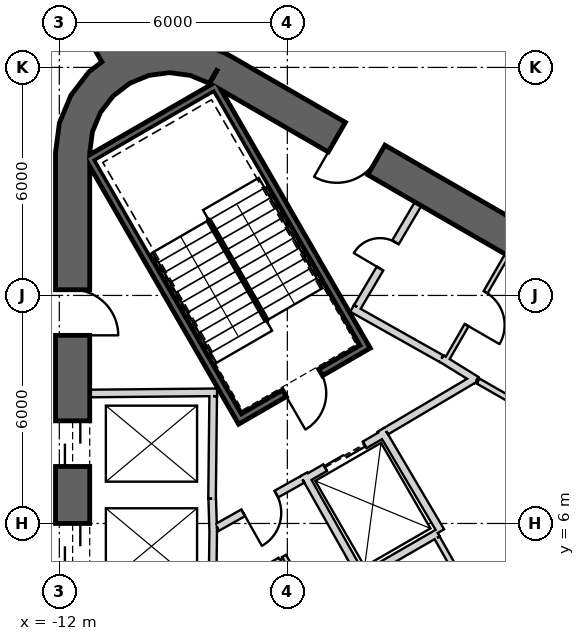
"""IFC4 building model, lengths in metres.
Left out: names, types, materials, properties, quantities, classifications, styles, units other than length and angle.
Written with IfcOpenShell. Run it as: python <this file> out.ifc"""

import sys

from ifc_helpers import new_model, si_unit, direction, frame, frame_2d, origin, place, context, subcontext, project, spatial, polyline, rectangle, outline, extrude, element, fill, save


model = new_model("IFC4")
c1 = context("Model", 3, precision=1e-05, world=origin(), true_north=direction((0.0, 1.0)))
c2 = subcontext(c1, "Body", "Model", "MODEL_VIEW")
j1 = project(units=[si_unit("LENGTHUNIT", "METRE"), si_unit("PLANEANGLEUNIT", "RADIAN")], contexts=[c1])
p1 = place(None, origin())
s1 = spatial("IfcSite", under=j1, at=p1, CompositionType="ELEMENT")
p2 = place(p1, origin())
s2 = spatial("IfcBuilding", under=s1, at=p2, CompositionType="ELEMENT")
p3 = place(p2, frame((0.0, 0.0, 181.2)))
s3 = spatial("IfcBuildingStorey", under=s2, at=p3, CompositionType="ELEMENT", Elevation=181.2)
p4 = place(p3, frame((19.475, 2.208, 0.0), z_axis=(0.0, 0.0, 1.0), x_axis=(-0.866028369851, 0.499994862586, 0.0)))
e1 = element("IfcWall", 1, at=p4, inside=s3, PredefinedType="SHEAR", context=c2, shape_type="SweptSolid", body=[
    extrude(rectangle(XDim=31.523, YDim=0.9, at=frame_2d((15.762, 0.0))), origin(), (0.0, 0.0, 1.0), 4.0),
])
p5 = place(p4, frame((7.062, 0.0, 0.0)))
e2 = element("IfcOpeningElement", 2, at=p5, cuts=e1, PredefinedType="OPENING", context=c2, shape_type="SweptSolid", body=[
    extrude(rectangle(XDim=1.2, YDim=2.4, at=frame_2d((0.6, 1.2))), frame((0.0, 0.46, 0.0), z_axis=(0.0, -1.0, 0.0), x_axis=(1.0, 0.0, 0.0)), (0.0, 0.0, 1.0), 0.92),
])
p6 = place(p4, frame((3.612, 0.0, 0.0)))
e3 = element("IfcOpeningElement", 3, at=p6, cuts=e1, PredefinedType="OPENING", context=c2, shape_type="SweptSolid", body=[
    extrude(rectangle(XDim=1.2, YDim=2.4, at=frame_2d((0.6, 1.2))), frame((0.0, 0.46, 0.0), z_axis=(0.0, -1.0, 0.0), x_axis=(1.0, 0.0, 0.0)), (0.0, 0.0, 1.0), 0.92),
])
p7 = place(p4, frame((26.712, 0.0, 0.0)))
e4 = element("IfcOpeningElement", 4, at=p7, cuts=e1, PredefinedType="OPENING", context=c2, shape_type="SweptSolid", body=[
    extrude(rectangle(XDim=1.2, YDim=2.4, at=frame_2d((0.6, 1.2))), frame((0.0, 0.46, 0.0), z_axis=(0.0, -1.0, 0.0), x_axis=(1.0, 0.0, 0.0)), (0.0, 0.0, 1.0), 0.92),
])
p8 = place(p3, frame((-11.65, 15.762, 0.0), z_axis=(0.0, 0.0, 1.0), x_axis=(0.0, -1.0, 0.0)))
e5 = element("IfcWall", 5, at=p8, inside=s3, PredefinedType="SHEAR", context=c2, shape_type="SweptSolid", body=[
    extrude(rectangle(XDim=31.523, YDim=0.9, at=frame_2d((15.762, 0.0))), origin(), (0.0, 0.0, 1.0), 4.0),
])
p9 = place(p8, frame((7.062, 0.0, 0.0)))
e6 = element("IfcOpeningElement", 6, at=p9, cuts=e5, PredefinedType="OPENING", context=c2, shape_type="SweptSolid", body=[
    extrude(rectangle(XDim=1.2, YDim=2.4, at=frame_2d((0.6, 1.2))), frame((0.0, 0.46, 0.0), z_axis=(0.0, -1.0, 0.0), x_axis=(1.0, 0.0, 0.0)), (0.0, 0.0, 1.0), 0.92),
])
p10 = place(p8, frame((9.762, 0.0, 0.0)))
e7 = element("IfcOpeningElement", 7, at=p10, cuts=e5, PredefinedType="OPENING", context=c2, shape_type="SweptSolid", body=[
    extrude(rectangle(XDim=1.2, YDim=2.4, at=frame_2d((0.6, 1.2))), frame((0.0, 0.46, 0.0), z_axis=(0.0, -1.0, 0.0), x_axis=(1.0, 0.0, 0.0)), (0.0, 0.0, 1.0), 0.92),
])
p11 = place(p8, frame((12.462, 0.0, 0.0)))
e8 = element("IfcOpeningElement", 8, at=p11, cuts=e5, PredefinedType="OPENING", context=c2, shape_type="SweptSolid", body=[
    extrude(rectangle(XDim=1.2, YDim=2.4, at=frame_2d((0.6, 1.2))), frame((0.0, 0.46, 0.0), z_axis=(0.0, -1.0, 0.0), x_axis=(1.0, 0.0, 0.0)), (0.0, 0.0, 1.0), 0.92),
])
p12 = place(p8, frame((15.162, 0.0, 0.0)))
e9 = element("IfcOpeningElement", 9, at=p12, cuts=e5, PredefinedType="OPENING", context=c2, shape_type="SweptSolid", body=[
    extrude(rectangle(XDim=1.2, YDim=2.4, at=frame_2d((0.6, 1.2))), frame((0.0, 0.46, 0.0), z_axis=(0.0, -1.0, 0.0), x_axis=(1.0, 0.0, 0.0)), (0.0, 0.0, 1.0), 0.92),
])
p13 = place(p8, frame((17.862, 0.0, 0.0)))
e10 = element("IfcOpeningElement", 10, at=p13, cuts=e5, PredefinedType="OPENING", context=c2, shape_type="SweptSolid", body=[
    extrude(rectangle(XDim=1.2, YDim=2.4, at=frame_2d((0.6, 1.2))), frame((0.0, 0.46, 0.0), z_axis=(0.0, -1.0, 0.0), x_axis=(1.0, 0.0, 0.0)), (0.0, 0.0, 1.0), 0.92),
])
p14 = place(p8, frame((20.562, 0.0, 0.0)))
e11 = element("IfcOpeningElement", 11, at=p14, cuts=e5, PredefinedType="OPENING", context=c2, shape_type="SweptSolid", body=[
    extrude(rectangle(XDim=1.2, YDim=2.4, at=frame_2d((0.6, 1.2))), frame((0.0, 0.46, 0.0), z_axis=(0.0, -1.0, 0.0), x_axis=(1.0, 0.0, 0.0)), (0.0, 0.0, 1.0), 0.92),
])
p15 = place(p8, frame((23.262, 0.0, 0.0)))
e12 = element("IfcOpeningElement", 12, at=p15, cuts=e5, PredefinedType="OPENING", context=c2, shape_type="SweptSolid", body=[
    extrude(rectangle(XDim=1.2, YDim=2.4, at=frame_2d((0.6, 1.2))), frame((0.0, 0.46, 0.0), z_axis=(0.0, -1.0, 0.0), x_axis=(1.0, 0.0, 0.0)), (0.0, 0.0, 1.0), 0.92),
])
p16 = place(p8, frame((3.612, 0.0, 0.0)))
e13 = element("IfcOpeningElement", 13, at=p16, cuts=e5, PredefinedType="OPENING", context=c2, shape_type="SweptSolid", body=[
    extrude(rectangle(XDim=1.2, YDim=2.4, at=frame_2d((0.6, 1.2))), frame((0.0, 0.46, 0.0), z_axis=(0.0, -1.0, 0.0), x_axis=(1.0, 0.0, 0.0)), (0.0, 0.0, 1.0), 0.92),
])
p17 = place(p8, frame((26.712, 0.0, 0.0)))
e14 = element("IfcOpeningElement", 14, at=p17, cuts=e5, PredefinedType="OPENING", context=c2, shape_type="SweptSolid", body=[
    extrude(rectangle(XDim=1.2, YDim=2.4, at=frame_2d((0.6, 1.2))), frame((0.0, 0.46, 0.0), z_axis=(0.0, -1.0, 0.0), x_axis=(1.0, 0.0, 0.0)), (0.0, 0.0, 1.0), 0.92),
])
p18 = place(p3, origin())
e15 = element("IfcWall", 15, at=p18, inside=s3, PredefinedType="SHEAR", context=c2, shape_type="SweptSolid", body=[
    extrude(outline(polyline([(-7.6, 18.36), (-8.323, 18.659), (-9.1, 18.762), (-9.876, 18.659), (-10.6, 18.36), (-11.221, 17.883), (-11.698, 17.262), (-11.998, 16.538), (-12.1, 15.762), (-11.2, 15.762), (-11.128, 16.305), (-10.919, 16.812), (-10.585, 17.247), (-10.15, 17.58), (-9.644, 17.79), (-9.1, 17.862), (-8.556, 17.79), (-8.05, 17.58), (-7.6, 18.36)])), origin(), (0.0, 0.0, 1.0), 4.0),
])
p19 = place(p3, frame((-10.575, 18.316, 0.0), z_axis=(0.0, 0.0, 1.0), x_axis=(-0.500002625756, 0.866023887798, 0.0)))
e16 = element("IfcWall", 16, at=p19, inside=s3, PredefinedType="SHEAR", context=c2, shape_type="SweptSolid", body=[
    extrude(rectangle(XDim=12.22, YDim=0.7, at=frame_2d((6.11, 0.0))), origin(), (0.0, 0.0, 1.0), 4.0),
])
p20 = place(p3, frame((-11.2, 9.42, 0.0), z_axis=(0.0, 0.0, 1.0), x_axis=(0.999957167047, 0.009255488683, 0.0)))
e17 = element("IfcWall", 17, at=p20, inside=s3, PredefinedType="PLUMBINGWALL", context=c2, shape_type="SweptSolid", body=[
    extrude(rectangle(XDim=3.35, YDim=0.2, at=frame_2d((1.675, 0.0))), origin(), (0.0, 0.0, 1.0), 3.7),
])
p21 = place(p3, frame((-7.951, 9.35, 0.0), z_axis=(0.0, 0.0, 1.0), x_axis=(-0.011120469654, -0.999938165666, 0.0)))
e18 = element("IfcWall", 18, at=p21, inside=s3, PredefinedType="PLUMBINGWALL", context=c2, shape_type="SweptSolid", body=[
    extrude(rectangle(XDim=2.7, YDim=0.2, at=frame_2d((1.35, 0.0))), origin(), (0.0, 0.0, 1.0), 3.7),
])
p22 = place(p3, frame((-7.977, 6.65, 0.0), z_axis=(0.0, 0.0, 1.0), x_axis=(0.030861509705, -0.999523670164, 0.0)))
e19 = element("IfcWall", 19, at=p22, inside=s3, PredefinedType="PLUMBINGWALL", context=c2, shape_type="SweptSolid", body=[
    extrude(rectangle(XDim=0.878, YDim=0.2, at=frame_2d((0.439, 0.0))), origin(), (0.0, 0.0, 1.0), 3.7),
])
p23 = place(p3, frame((-7.949, 5.895, 0.0), z_axis=(0.0, 0.0, 1.0), x_axis=(-0.012042535896, -0.999927486035, 0.0)))
e20 = element("IfcWall", 20, at=p23, inside=s3, PredefinedType="PLUMBINGWALL", context=c2, shape_type="SweptSolid", body=[
    extrude(rectangle(XDim=1.845, YDim=0.2, at=frame_2d((0.922, 0.0))), origin(), (0.0, 0.0, 1.0), 3.7),
])
p24 = place(p3, frame((-11.245, 15.678, -0.3), z_axis=(0.0, 0.0, 1.0), x_axis=(0.499977274689, -0.866038523851, 0.0)))
e21 = element("IfcWall", 21, at=p24, inside=s3, PredefinedType="SHEAR", context=c2, shape_type="SweptSolid", body=[
    extrude(rectangle(XDim=8.1, YDim=0.2, at=frame_2d((4.05, 0.0))), origin(), (0.0, 0.0, 1.0), 4.0),
])
p25 = place(p3, frame((-7.818, 17.541, -0.3), z_axis=(0.0, 0.0, 1.0), x_axis=(-0.866044365799, -0.499967155389, 0.0)))
e22 = element("IfcWall", 22, at=p25, inside=s3, PredefinedType="SHEAR", context=c2, shape_type="SweptSolid", body=[
    extrude(rectangle(XDim=3.8, YDim=0.2, at=frame_2d((1.9, 0.0))), origin(), (0.0, 0.0, 1.0), 4.0),
])
p26 = place(p3, frame((-7.854, 17.405, -0.3), z_axis=(0.0, 0.0, 1.0), x_axis=(0.499997992926, -0.866026562566, 0.0)))
e23 = element("IfcWall", 23, at=p26, inside=s3, PredefinedType="SHEAR", context=c2, shape_type="SweptSolid", body=[
    extrude(rectangle(XDim=7.9, YDim=0.2, at=frame_2d((3.95, 0.0))), origin(), (0.0, 0.0, 1.0), 4.0),
])
p27 = place(p3, frame((-7.159, 8.8, -0.3), z_axis=(0.0, 0.0, 1.0), x_axis=(0.866047807691, 0.499961193289, 0.0)))
e24 = element("IfcWall", 24, at=p27, inside=s3, PredefinedType="SHEAR", context=c2, shape_type="SweptSolid", body=[
    extrude(rectangle(XDim=3.6, YDim=0.2, at=frame_2d((1.8, 0.0))), origin(), (0.0, 0.0, 1.0), 4.0),
])
p28 = place(p27, frame((1.25, 0.0, 0.3)))
e25 = element("IfcOpeningElement", 25, at=p28, cuts=e24, PredefinedType="OPENING", context=c2, shape_type="SweptSolid", body=[
    extrude(rectangle(XDim=1.1, YDim=2.1, at=frame_2d((0.55, 1.05))), frame((0.0, 0.11, 0.0), z_axis=(0.0, -1.0, 0.0), x_axis=(1.0, 0.0, 0.0)), (0.0, 0.0, 1.0), 0.22),
])
p29 = place(p3, frame((-5.524, 7.168, 0.0), z_axis=(0.0, 0.0, 1.0), x_axis=(0.866024647952, 0.500001309137, 0.0)))
e26 = element("IfcWall", 26, at=p29, inside=s3, PredefinedType="PLUMBINGWALL", context=c2, shape_type="SweptSolid", body=[
    extrude(rectangle(XDim=2.4, YDim=0.2, at=frame_2d((1.2, 0.0))), origin(), (0.0, 0.0, 1.0), 3.7),
])
p30 = place(p29, frame((0.6, 0.0, 0.0)))
e27 = element("IfcOpeningElement", 27, at=p30, cuts=e26, PredefinedType="OPENING", context=c2, shape_type="SweptSolid", body=[
    extrude(rectangle(XDim=1.2, YDim=2.4, at=frame_2d((0.6, 1.2))), frame((0.0, 0.11, 0.0), z_axis=(0.0, -1.0, 0.0), x_axis=(1.0, 0.0, 0.0)), (0.0, 0.0, 1.0), 0.22),
])
p31 = place(p3, frame((-3.538, 8.465, 0.0), z_axis=(0.0, 0.0, 1.0), x_axis=(0.508647062354, -0.860975125052, 0.0)))
e28 = element("IfcWall", 28, at=p31, inside=s3, PredefinedType="PLUMBINGWALL", context=c2, shape_type="SweptSolid", body=[
    extrude(rectangle(XDim=3.1, YDim=0.2, at=frame_2d((1.55, 0.0))), origin(), (0.0, 0.0, 1.0), 3.7),
])
p32 = place(p3, frame((-2.043, 5.748, 0.0), z_axis=(0.0, 0.0, 1.0), x_axis=(-0.866035096217, -0.499983211839, 0.0)))
e29 = element("IfcWall", 29, at=p32, inside=s3, PredefinedType="PLUMBINGWALL", context=c2, shape_type="SweptSolid", body=[
    extrude(rectangle(XDim=2.404, YDim=0.2, at=frame_2d((1.202, 0.0))), origin(), (0.0, 0.0, 1.0), 3.7),
])
p33 = place(p3, frame((-5.562, 7.296, 0.0), z_axis=(0.0, 0.0, 1.0), x_axis=(0.49134651263, -0.870964180966, 0.0)))
e30 = element("IfcWall", 30, at=p33, inside=s3, PredefinedType="PLUMBINGWALL", context=c2, shape_type="SweptSolid", body=[
    extrude(rectangle(XDim=3.0, YDim=0.2, at=frame_2d((1.5, 0.0))), origin(), (0.0, 0.0, 1.0), 3.7),
])
p34 = place(p3, frame((-0.22, 13.06, 0.0), z_axis=(0.0, 0.0, 1.0), x_axis=(-0.499984717929, -0.866034226713, 0.0)))
e31 = element("IfcWall", 31, at=p34, inside=s3, PredefinedType="PARTITIONING", context=c2, shape_type="SweptSolid", body=[
    extrude(rectangle(XDim=3.25, YDim=0.12, at=frame_2d((1.625, 0.0))), origin(), (0.0, 0.0, 1.0), 3.7),
])
p35 = place(p34, frame((1.125, 0.0, 0.0)))
e32 = element("IfcOpeningElement", 32, at=p35, cuts=e31, PredefinedType="OPENING", context=c2, shape_type="SweptSolid", body=[
    extrude(rectangle(XDim=1.0, YDim=2.1, at=frame_2d((0.5, 1.05))), frame((0.0, 0.07, 0.0), z_axis=(0.0, -1.0, 0.0), x_axis=(1.0, 0.0, 0.0)), (0.0, 0.0, 1.0), 0.14),
])
p36 = place(p3, frame((-1.941, 10.339, 0.0), z_axis=(0.0, 0.0, 1.0), x_axis=(0.850216889117, -0.526432561171, 0.0)))
e33 = element("IfcWall", 33, at=p36, inside=s3, PredefinedType="PARTITIONING", context=c2, shape_type="SweptSolid", body=[
    extrude(rectangle(XDim=1.078, YDim=0.2, at=frame_2d((0.539, 0.0))), origin(), (0.0, 0.0, 1.0), 3.7),
])
p37 = place(p3, frame((5.159, 6.236, 0.0), z_axis=(0.0, 0.0, 1.0), x_axis=(-0.868105023632, 0.496380567654, 0.0)))
e34 = element("IfcWall", 34, at=p37, inside=s3, PredefinedType="PLUMBINGWALL", context=c2, shape_type="SweptSolid", body=[
    extrude(rectangle(XDim=7.072, YDim=0.15, at=frame_2d((3.536, 0.0))), origin(), (0.0, 0.0, 1.0), 3.7),
])
p38 = place(p3, frame((-4.296, 11.659, 0.0), z_axis=(0.0, 0.0, 1.0), x_axis=(0.871534483978, -0.490334215854, 0.0)))
e35 = element("IfcWall", 35, at=p38, inside=s3, PredefinedType="PARTITIONING", context=c2, shape_type="SweptSolid", body=[
    extrude(rectangle(XDim=2.7, YDim=0.2, at=frame_2d((1.35, 0.0))), origin(), (0.0, 0.0, 1.0), 3.7),
])
p39 = place(p3, frame((-2.558, 14.409, 0.0), z_axis=(0.0, 0.0, 1.0), x_axis=(-0.508018930956, -0.861345903683, 0.0)))
e36 = element("IfcWall", 36, at=p39, inside=s3, PredefinedType="PARTITIONING", context=c2, shape_type="SweptSolid", body=[
    extrude(rectangle(XDim=3.15, YDim=0.2, at=frame_2d((1.575, 0.0))), origin(), (0.0, 0.0, 1.0), 3.7),
])
p40 = place(p39, frame((1.175, 0.0, 0.0)))
e37 = element("IfcOpeningElement", 37, at=p40, cuts=e36, PredefinedType="OPENING", context=c2, shape_type="SweptSolid", body=[
    extrude(rectangle(XDim=0.8, YDim=2.1, at=frame_2d((0.4, 1.05))), frame((0.0, 0.11, 0.0), z_axis=(0.0, -1.0, 0.0), x_axis=(1.0, 0.0, 0.0)), (0.0, 0.0, 1.0), 0.22),
])
p41 = place(p3, frame((-1.055, 9.818, 0.0), z_axis=(0.0, 0.0, 1.0), x_axis=(-0.860614334655, -0.50925726994, 0.0)))
e38 = element("IfcWall", 38, at=p41, inside=s3, PredefinedType="PARTITIONING", context=c2, shape_type="SweptSolid", body=[
    extrude(rectangle(XDim=2.726, YDim=0.2, at=frame_2d((1.363, 0.0))), origin(), (0.0, 0.0, 1.0), 3.7),
])
p42 = place(p3, frame((-5.6, 7.16, 0.0), z_axis=(0.0, 0.0, 1.0), x_axis=(-0.871363259478, -0.490638431059, 0.0)))
e39 = element("IfcWall", 39, at=p42, inside=s3, PredefinedType="PARTITIONING", context=c2, shape_type="SweptSolid", body=[
    extrude(rectangle(XDim=2.581, YDim=0.2, at=frame_2d((1.291, 0.0))), origin(), (0.0, 0.0, 1.0), 3.7),
])
p43 = place(p42, frame((0.791, 0.0, 0.0)))
e40 = element("IfcOpeningElement", 40, at=p43, cuts=e39, PredefinedType="OPENING", context=c2, shape_type="SweptSolid", body=[
    extrude(rectangle(XDim=1.0, YDim=2.1, at=frame_2d((0.5, 1.05))), frame((0.0, 0.11, 0.0), z_axis=(0.0, -1.0, 0.0), x_axis=(1.0, 0.0, 0.0)), (0.0, 0.0, 1.0), 0.22),
])
p44 = place(p3, frame((-2.059, 5.624, 0.0), z_axis=(0.0, 0.0, 1.0), x_axis=(0.49265005812, -0.870227510617, 0.0)))
e41 = element("IfcWall", 41, at=p44, inside=s3, PredefinedType="PLUMBINGWALL", context=c2, shape_type="SweptSolid", body=[
    extrude(rectangle(XDim=3.365, YDim=0.15, at=frame_2d((1.683, 0.0))), origin(), (0.0, 0.0, 1.0), 3.7),
])
p45 = place(p3, frame((-6.231, 5.062, 0.0), z_axis=(0.0, 0.0, 1.0), x_axis=(0.0, -1.0, 0.0)))
e42 = element("IfcWall", 42, at=p45, inside=s3, PredefinedType="PARTITIONING", context=c2, shape_type="SweptSolid", body=[
    extrude(rectangle(XDim=10.125, YDim=0.12, at=frame_2d((5.062, 0.0))), origin(), (0.0, 0.0, 1.0), 3.7),
])
p46 = place(p3, frame((-6.201, 5.046, 0.0), z_axis=(0.0, 0.0, 1.0), x_axis=(-0.867071050325, -0.498184497639, 0.0)))
e43 = element("IfcWall", 43, at=p46, inside=s3, PredefinedType="PARTITIONING", context=c2, shape_type="SweptSolid", body=[
    extrude(rectangle(XDim=2.017, YDim=0.12, at=frame_2d((1.008, 0.0))), origin(), (0.0, 0.0, 1.0), 3.7),
])
p47 = place(p3, frame((-4.558, 2.495, 0.0), z_axis=(0.0, 0.0, 1.0), x_axis=(-0.499991792115, 0.866030142557, 0.0)))
e44 = element("IfcWall", 44, at=p47, inside=s3, PredefinedType="PARTITIONING", context=c2, shape_type="SweptSolid", body=[
    extrude(rectangle(XDim=3.06, YDim=0.12, at=frame_2d((1.53, 0.0))), origin(), (0.0, 0.0, 1.0), 3.7),
])
p48 = place(p3, frame((10.325, 13.784, 0.0), z_axis=(0.0, 0.0, 1.0), x_axis=(-0.866025119466, 0.500000492453, 0.0)))
e45 = element("IfcWall", 45, at=p48, inside=s3, PredefinedType="PARTITIONING", context=c2, shape_type="SweptSolid", body=[
    extrude(rectangle(XDim=18.673, YDim=0.2, at=frame_2d((9.336, 0.0))), origin(), (0.0, 0.0, 1.0), 2.88),
])
p49 = place(p28, origin())
e46 = element("IfcDoor", 46, at=p49, inside=s3, OperationType="SINGLE_SWING_LEFT", PredefinedType="USERDEFINED", context=c2, shape_type="SweptSolid", body=[
    extrude(rectangle(XDim=1.1, YDim=2.1, at=frame_2d((0.55, 1.05))), frame((0.0, 0.025, 0.0), z_axis=(0.0, -1.0, 0.0), x_axis=(1.0, 0.0, 0.0)), (0.0, 0.0, 1.0), 0.05),
])
fill(e25, e46)
p50 = place(p43, origin())
e47 = element("IfcDoor", 47, at=p50, inside=s3, OperationType="SINGLE_SWING_LEFT", PredefinedType="USERDEFINED", context=c2, shape_type="SweptSolid", body=[
    extrude(rectangle(XDim=1.0, YDim=2.1, at=frame_2d((0.5, 1.05))), frame((0.0, 0.025, 0.0), z_axis=(0.0, -1.0, 0.0), x_axis=(1.0, 0.0, 0.0)), (0.0, 0.0, 1.0), 0.05),
])
fill(e40, e47)
p51 = place(p30, origin())
e48 = element("IfcDoor", 48, at=p51, inside=s3, OperationType="SLIDING_TO_LEFT", PredefinedType="USERDEFINED", context=c2, shape_type="SweptSolid", body=[
    extrude(rectangle(XDim=1.2, YDim=2.4, at=frame_2d((0.6, 1.2))), frame((0.0, 0.025, 0.0), z_axis=(0.0, -1.0, 0.0), x_axis=(1.0, 0.0, 0.0)), (0.0, 0.0, 1.0), 0.05),
])
fill(e27, e48)
p52 = place(p40, origin())
e49 = element("IfcDoor", 49, at=p52, inside=s3, OperationType="SINGLE_SWING_RIGHT", PredefinedType="USERDEFINED", context=c2, shape_type="SweptSolid", body=[
    extrude(rectangle(XDim=0.8, YDim=2.1, at=frame_2d((0.4, 1.05))), frame((0.0, 0.025, 0.0), z_axis=(0.0, -1.0, 0.0), x_axis=(1.0, 0.0, 0.0)), (0.0, 0.0, 1.0), 0.05),
])
fill(e37, e49)
p53 = place(p35, origin())
e50 = element("IfcDoor", 50, at=p53, inside=s3, OperationType="SINGLE_SWING_LEFT", PredefinedType="NOTDEFINED", context=c2, shape_type="SweptSolid", body=[
    extrude(rectangle(XDim=1.0, YDim=2.1, at=frame_2d((0.5, 1.05))), frame((0.0, 0.025, 0.0), z_axis=(0.0, -1.0, 0.0), x_axis=(1.0, 0.0, 0.0)), (0.0, 0.0, 1.0), 0.05),
])
fill(e32, e50)
p54 = place(p9, origin())
e51 = element("IfcDoor", 51, at=p54, inside=s3, OperationType="SLIDING_TO_LEFT", PredefinedType="USERDEFINED", context=c2, shape_type="SweptSolid", body=[
    extrude(rectangle(XDim=1.2, YDim=2.4, at=frame_2d((0.6, 1.2))), frame((0.0, 0.025, 0.0), z_axis=(0.0, -1.0, 0.0), x_axis=(1.0, 0.0, 0.0)), (0.0, 0.0, 1.0), 0.05),
])
fill(e6, e51)
p55 = place(p10, origin())
e52 = element("IfcDoor", 52, at=p55, inside=s3, OperationType="SLIDING_TO_LEFT", PredefinedType="USERDEFINED", context=c2, shape_type="SweptSolid", body=[
    extrude(rectangle(XDim=1.2, YDim=2.4, at=frame_2d((0.6, 1.2))), frame((0.0, 0.025, 0.0), z_axis=(0.0, -1.0, 0.0), x_axis=(1.0, 0.0, 0.0)), (0.0, 0.0, 1.0), 0.05),
])
fill(e7, e52)
p56 = place(p7, origin())
e53 = element("IfcDoor", 53, at=p56, inside=s3, OperationType="SINGLE_SWING_LEFT", PredefinedType="USERDEFINED", context=c2, shape_type="SweptSolid", body=[
    extrude(rectangle(XDim=1.2, YDim=2.4, at=frame_2d((0.6, 1.2))), frame((0.0, 0.025, 0.0), z_axis=(0.0, -1.0, 0.0), x_axis=(1.0, 0.0, 0.0)), (0.0, 0.0, 1.0), 0.05),
])
fill(e4, e53)
p57 = place(p16, origin())
e54 = element("IfcDoor", 54, at=p57, inside=s3, OperationType="SINGLE_SWING_RIGHT", PredefinedType="USERDEFINED", context=c2, shape_type="SweptSolid", body=[
    extrude(rectangle(XDim=1.2, YDim=2.4, at=frame_2d((0.6, 1.2))), frame((0.0, 0.025, 0.0), z_axis=(0.0, -1.0, 0.0), x_axis=(1.0, 0.0, 0.0)), (0.0, 0.0, 1.0), 0.05),
])
fill(e13, e54)
save(model, sys.argv[1])
